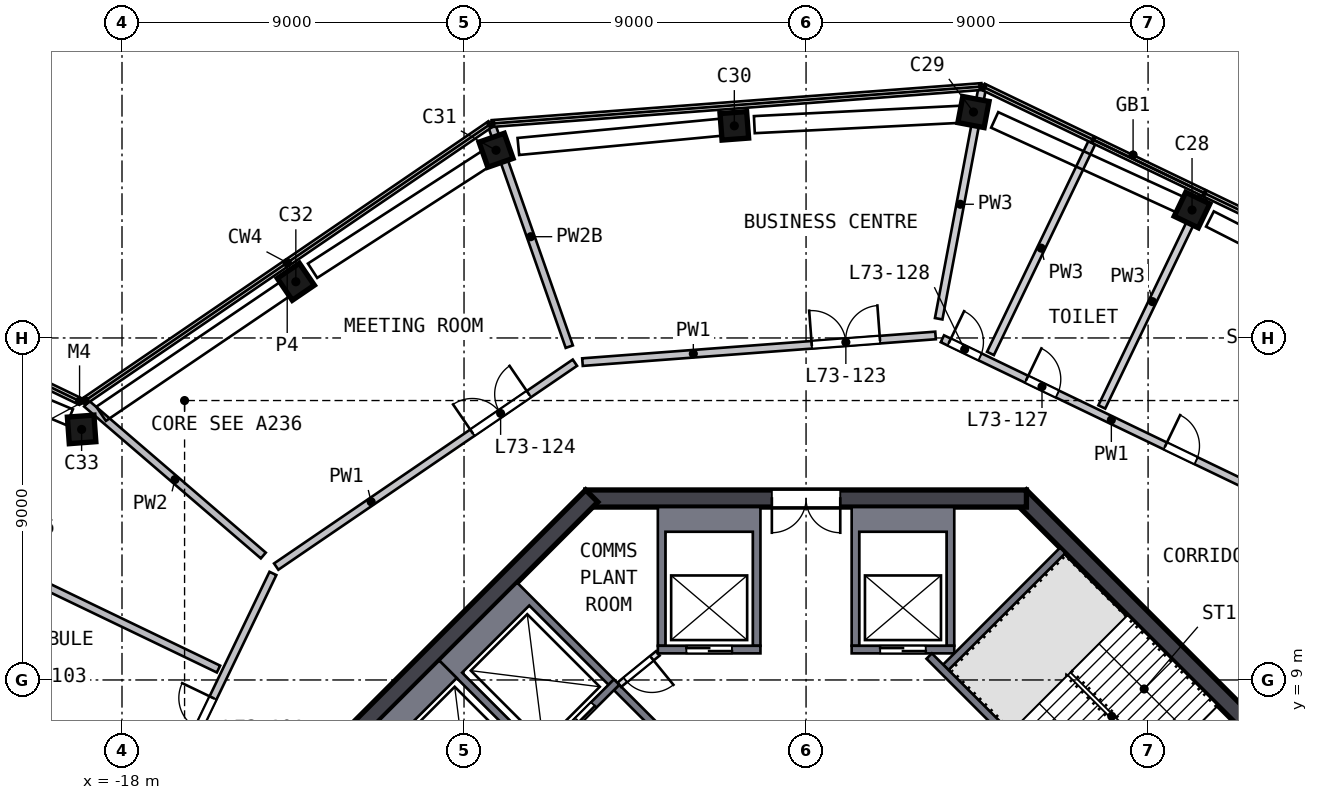
"""IFC4 building model, lengths in metres.
Left out: names, types, materials, properties, quantities, classifications, styles, units other than length and angle.
Written with IfcOpenShell. Run it as: python <this file> out.ifc"""

import sys

from ifc_helpers import new_model, si_unit, direction, frame, frame_2d, origin, origin_2d, place, context, subcontext, project, spatial, polyline, rectangle, outline, extrude, element, fill, save


model = new_model("IFC4")
c1 = context("Model", 3, precision=1e-05, world=origin(), true_north=direction((0.0, 1.0)))
c2 = subcontext(c1, "Body", "Model", "MODEL_VIEW")
j1 = project(units=[si_unit("LENGTHUNIT", "METRE"), si_unit("PLANEANGLEUNIT", "RADIAN")], contexts=[c1])
p1 = place(None, origin())
s1 = spatial("IfcSite", under=j1, at=p1, CompositionType="ELEMENT")
p2 = place(p1, origin())
s2 = spatial("IfcBuilding", under=s1, at=p2, CompositionType="ELEMENT")
p3 = place(p2, frame((0.0, 0.0, 295.0)))
s3 = spatial("IfcBuildingStorey", under=s2, at=p3, CompositionType="ELEMENT", Elevation=295.0)
p4 = place(p3, frame((10.252, 21.322, 0.0), z_axis=(-0.079403422, 0.037379974, 0.996141473), x_axis=(-0.897653527, 0.43187559, -0.08775888)))
e1 = element("IfcColumn", 1, at=p4, inside=s3, PredefinedType="COLUMN", context=c2, shape_type="SweptSolid", body=[
    extrude(rectangle(XDim=0.7, YDim=0.7, at=origin_2d()), origin(), (0.0, 0.0, 1.0), 4.206),
])
p5 = place(p3, frame((4.512, 23.926, 0.0), z_axis=(-0.088844536, 0.015958359, 0.995917657), x_axis=(0.978708302, -0.184343741, 0.090263194)))
e2 = element("IfcColumn", 2, at=p5, inside=s3, PredefinedType="COLUMN", context=c2, shape_type="SweptSolid", body=[
    extrude(rectangle(XDim=0.7, YDim=0.7, at=origin_2d()), origin(), (0.0, 0.0, 1.0), 4.207),
])
p6 = place(p3, frame((-1.782, 23.591, 0.0), z_axis=(-0.087471347, -0.007313464, 0.996140189), x_axis=(-0.993342185, -0.074613173, -0.087773449)))
e3 = element("IfcColumn", 3, at=p6, inside=s3, PredefinedType="COLUMN", context=c2, shape_type="SweptSolid", body=[
    extrude(rectangle(XDim=0.7, YDim=0.7, at=origin_2d()), origin(), (0.0, 0.0, 1.0), 4.206),
])
p7 = place(p3, frame((-8.055, 22.977, 0.0), z_axis=(-0.084956294, -0.030581945, 0.995915244), x_axis=(0.939868366, 0.329386102, 0.090289813)))
e4 = element("IfcColumn", 4, at=p7, inside=s3, PredefinedType="COLUMN", context=c2, shape_type="SweptSolid", body=[
    extrude(rectangle(XDim=0.7, YDim=0.7, at=origin_2d()), origin(), (0.0, 0.0, 1.0), 4.207),
])
p8 = place(p3, frame((-13.339, 19.54, 0.0), z_axis=(-0.072089807, -0.050091388, 0.996139505), x_axis=(-0.822815086, -0.561488906, -0.087781218)))
e5 = element("IfcColumn", 5, at=p8, inside=s3, PredefinedType="COLUMN", context=c2, shape_type="SweptSolid", body=[
    extrude(rectangle(XDim=0.7, YDim=0.7, at=origin_2d()), origin(), (0.0, 0.0, 1.0), 4.206),
])
p9 = place(p3, frame((-18.993, 15.679, 0.0), z_axis=(-0.057560792, -0.070848515, 0.995824906), x_axis=(0.995550487, 0.070467558, 0.062558383)))
e6 = element("IfcColumn", 6, at=p9, inside=s3, PredefinedType="COLUMN", context=c2, shape_type="SweptSolid", body=[
    extrude(rectangle(XDim=0.7, YDim=0.7, at=origin_2d()), origin(), (0.0, 0.0, 1.0), 4.208),
])
p10 = place(p3, frame((13.841, 5.64, 0.0), z_axis=(0.0, 0.0, 1.0), x_axis=(-0.707106781, 0.707106781, 0.0)))
e7 = element("IfcWall", 7, at=p10, inside=s3, PredefinedType="SHEAR", context=c2, shape_type="SweptSolid", body=[
    extrude(rectangle(XDim=11.598, YDim=0.45, at=frame_2d((5.799, 0.0))), origin(), (0.0, 0.0, 1.0), 4.5),
])
p11 = place(p10, frame((2.099, 0.0, 0.0)))
e8 = element("IfcOpeningElement", 8, at=p11, cuts=e7, PredefinedType="OPENING", context=c2, shape_type="SweptSolid", body=[
    extrude(rectangle(XDim=1.2, YDim=2.1, at=frame_2d((0.6, 1.05))), frame((0.0, 0.235, 0.0), z_axis=(0.0, -1.0, 0.0), x_axis=(1.0, 0.0, 0.0)), (0.0, 0.0, 1.0), 0.47),
])
p12 = place(p3, frame((5.799, 13.775, 0.0), z_axis=(0.0, 0.0, 1.0), x_axis=(-1.0, 0.0, 0.0)))
e9 = element("IfcWall", 9, at=p12, inside=s3, PredefinedType="SHEAR", context=c2, shape_type="SweptSolid", body=[
    extrude(rectangle(XDim=11.598, YDim=0.45, at=frame_2d((5.799, 0.0))), origin(), (0.0, 0.0, 1.0), 4.5),
])
p13 = place(p12, frame((4.899, 0.0, 0.0)))
e10 = element("IfcOpeningElement", 10, at=p13, cuts=e9, PredefinedType="OPENING", context=c2, shape_type="SweptSolid", body=[
    extrude(rectangle(XDim=1.8, YDim=2.1, at=frame_2d((0.9, 1.05))), frame((0.0, 0.235, 0.0), z_axis=(0.0, -1.0, 0.0), x_axis=(1.0, 0.0, 0.0)), (0.0, 0.0, 1.0), 0.47),
])
p14 = place(p3, frame((-5.64, 13.841, 0.0), z_axis=(0.0, 0.0, 1.0), x_axis=(-0.707106781, -0.707106781, 0.0)))
e11 = element("IfcWall", 11, at=p14, inside=s3, PredefinedType="SHEAR", context=c2, shape_type="SweptSolid", body=[
    extrude(rectangle(XDim=11.598, YDim=0.45, at=frame_2d((5.799, 0.0))), origin(), (0.0, 0.0, 1.0), 4.5),
])
p15 = place(p3, origin())
e12 = element("IfcWall", 12, at=p15, inside=s3, PredefinedType="SOLIDWALL", context=c2, shape_type="SweptSolid", body=[
    extrude(outline(polyline([(3.9, 9.9), (3.7, 9.9), (3.7, 12.9), (1.4, 12.9), (1.4, 9.9), (1.2, 9.9), (1.2, 13.55), (3.9, 13.55), (3.9, 9.9)])), origin(), (0.0, 0.0, 1.0), 4.19),
])
p16 = place(p3, frame((1.2, 9.8, 0.0), z_axis=(0.0, 0.0, 1.0), x_axis=(1.0, 0.0, 0.0)))
e13 = element("IfcWall", 13, at=p16, inside=s3, PredefinedType="SOLIDWALL", context=c2, shape_type="SweptSolid", body=[
    extrude(rectangle(XDim=2.7, YDim=0.2, at=frame_2d((1.35, 0.0))), origin(), (0.0, 0.0, 1.0), 4.19),
])
p17 = place(p16, frame((0.75, 0.0, 0.0)))
e14 = element("IfcOpeningElement", 14, at=p17, cuts=e13, PredefinedType="OPENING", context=c2, shape_type="SweptSolid", body=[
    extrude(rectangle(XDim=1.2, YDim=2.1, at=frame_2d((0.6, 1.05))), frame((0.0, 0.11, 0.0), z_axis=(0.0, -1.0, 0.0), x_axis=(1.0, 0.0, 0.0)), (0.0, 0.0, 1.0), 0.22),
])
p18 = place(p3, origin())
e15 = element("IfcWall", 15, at=p18, inside=s3, PredefinedType="SOLIDWALL", context=c2, shape_type="SweptSolid", body=[
    extrude(outline(polyline([(-3.9, 13.55), (-1.2, 13.55), (-1.2, 9.9), (-1.4, 9.9), (-1.4, 12.9), (-3.7, 12.9), (-3.7, 9.9), (-3.9, 9.9), (-3.9, 13.55)])), origin(), (0.0, 0.0, 1.0), 4.19),
])
p19 = place(p3, frame((-1.2, 9.8, 0.0), z_axis=(0.0, 0.0, 1.0), x_axis=(-1.0, 0.0, 0.0)))
e16 = element("IfcWall", 16, at=p19, inside=s3, PredefinedType="SOLIDWALL", context=c2, shape_type="SweptSolid", body=[
    extrude(rectangle(XDim=2.7, YDim=0.2, at=frame_2d((1.35, 0.0))), origin(), (0.0, 0.0, 1.0), 4.19),
])
p20 = place(p19, frame((0.75, 0.0, 0.0)))
e17 = element("IfcOpeningElement", 17, at=p20, cuts=e16, PredefinedType="OPENING", context=c2, shape_type="SweptSolid", body=[
    extrude(rectangle(XDim=1.2, YDim=2.1, at=frame_2d((0.6, 1.05))), frame((0.0, 0.11, 0.0), z_axis=(0.0, -1.0, 0.0), x_axis=(1.0, 0.0, 0.0)), (0.0, 0.0, 1.0), 0.22),
])
p21 = place(p3, origin())
e18 = element("IfcWall", 18, at=p21, inside=s3, PredefinedType="SOLIDWALL", context=c2, shape_type="SweptSolid", body=[
    extrude(outline(polyline([(-9.652, 9.51), (-7.601, 11.561), (-5.056, 9.016), (-5.197, 8.874), (-7.283, 10.96), (-9.051, 9.192), (-6.965, 7.106), (-7.106, 6.965), (-9.652, 9.51)])), origin(), (0.0, 0.0, 1.0), 4.19),
])
p22 = place(p3, frame((-4.985, 8.945, 0.0), z_axis=(0.0, 0.0, 1.0), x_axis=(-0.707106781, -0.707106781, 0.0)))
e19 = element("IfcWall", 19, at=p22, inside=s3, PredefinedType="SOLIDWALL", context=c2, shape_type="SweptSolid", body=[
    extrude(rectangle(XDim=2.9, YDim=0.2, at=frame_2d((1.45, 0.0))), origin(), (0.0, 0.0, 1.0), 4.19),
])
p23 = place(p22, frame((0.85, 0.0, 0.0)))
e20 = element("IfcOpeningElement", 20, at=p23, cuts=e19, PredefinedType="OPENING", context=c2, shape_type="SweptSolid", body=[
    extrude(rectangle(XDim=1.2, YDim=2.1, at=frame_2d((0.6, 1.05))), frame((0.0, 0.11, 0.0), z_axis=(0.0, -1.0, 0.0), x_axis=(1.0, 0.0, 0.0)), (0.0, 0.0, 1.0), 0.22),
])
p24 = place(p3, origin())
e21 = element("IfcWall", 21, at=p24, inside=s3, PredefinedType="SOLIDWALL", context=c2, shape_type="SweptSolid", body=[
    extrude(outline(polyline([(-11.561, 7.601), (-9.652, 9.51), (-9.192, 9.051), (-10.96, 7.283), (-8.874, 5.197), (-9.016, 5.056), (-11.561, 7.601)])), origin(), (0.0, 0.0, 1.0), 4.19),
])
p25 = place(p3, frame((3.24, 9.629, 0.0), z_axis=(0.0, 0.0, 1.0), x_axis=(0.707106781, -0.707106781, 0.0)))
e22 = element("IfcWall", 22, at=p25, inside=s3, PredefinedType="SOLIDWALL", context=c2, shape_type="SweptSolid", body=[
    extrude(rectangle(XDim=9.036, YDim=0.2, at=frame_2d((4.518, 0.0))), origin(), (0.0, 0.0, 1.0), 4.19),
])
p26 = place(p25, frame((7.018, 0.0, 0.0)))
e23 = element("IfcOpeningElement", 23, at=p26, cuts=e22, PredefinedType="OPENING", context=c2, shape_type="SweptSolid", body=[
    extrude(rectangle(XDim=1.2, YDim=2.1, at=frame_2d((0.6, 1.05))), frame((0.0, 0.11, 0.0), z_axis=(0.0, -1.0, 0.0), x_axis=(1.0, 0.0, 0.0)), (0.0, 0.0, 1.0), 0.22),
])
p27 = place(p3, frame((3.677, 9.334, 0.0), z_axis=(0.0, 0.0, 1.0), x_axis=(0.707106781, 0.707106781, 0.0)))
e24 = element("IfcWall", 24, at=p27, inside=s3, PredefinedType="SOLIDWALL", context=c2, shape_type="SweptSolid", body=[
    extrude(rectangle(XDim=4.35, YDim=0.2, at=frame_2d((2.175, 0.0))), origin(), (0.0, 0.0, 1.0), 4.19),
])
p28 = place(p3, frame((-3.005, 6.823, 0.0), z_axis=(0.0, 0.0, 1.0), x_axis=(-0.707106781, 0.707106781, 0.0)))
e25 = element("IfcWall", 25, at=p28, inside=s3, PredefinedType="SOLIDWALL", context=c2, shape_type="SweptSolid", body=[
    extrude(rectangle(XDim=2.8, YDim=0.2, at=frame_2d((1.4, 0.0))), origin(), (0.0, 0.0, 1.0), 4.19),
])
p29 = place(p3, frame((-3.9, 9.7, 0.0), z_axis=(0.0, 0.0, 1.0), x_axis=(-0.775559878, -0.631274009, 0.0)))
e26 = element("IfcWall", 26, at=p29, inside=s3, PredefinedType="PARTITIONING", context=c2, shape_type="SweptSolid", body=[
    extrude(rectangle(XDim=1.308, YDim=0.15, at=frame_2d((0.654, 0.0))), origin(), (0.0, 0.0, 1.0), 4.19),
])
p30 = place(p29, frame((0.204, 0.0, 0.0)))
e27 = element("IfcOpeningElement", 27, at=p30, cuts=e26, PredefinedType="OPENING", context=c2, shape_type="SweptSolid", body=[
    extrude(rectangle(XDim=0.9, YDim=2.1, at=frame_2d((0.45, 1.05))), frame((0.0, 0.085, 0.0), z_axis=(0.0, -1.0, 0.0), x_axis=(1.0, 0.0, 0.0)), (0.0, 0.0, 1.0), 0.17),
])
p31 = place(p3, frame((-18.066, 3.407, 0.0), z_axis=(0.0, 0.0, 1.0), x_axis=(0.433334957, 0.901232942, 0.0)))
e28 = element("IfcWall", 28, at=p31, inside=s3, PredefinedType="SOLIDWALL", context=c2, shape_type="SweptSolid", body=[
    extrude(rectangle(XDim=9.317, YDim=0.2, at=frame_2d((4.658, 0.0))), origin(), (0.0, 0.0, 1.0), 4.19),
])
p32 = place(p31, frame((3.881, 0.0, 0.0)))
e29 = element("IfcOpeningElement", 29, at=p32, cuts=e28, PredefinedType="OPENING", context=c2, shape_type="SweptSolid", body=[
    extrude(rectangle(XDim=1.8, YDim=2.1, at=frame_2d((0.9, 1.05))), frame((0.0, 0.11, 0.0), z_axis=(0.0, -1.0, 0.0), x_axis=(1.0, 0.0, 0.0)), (0.0, 0.0, 1.0), 0.22),
])
p33 = place(p3, frame((-13.942, 11.984, 0.0), z_axis=(0.0, 0.0, 1.0), x_axis=(0.825910244, 0.563801622, 0.0)))
e30 = element("IfcWall", 30, at=p33, inside=s3, PredefinedType="SOLIDWALL", context=c2, shape_type="SweptSolid", body=[
    extrude(rectangle(XDim=9.517, YDim=0.2, at=frame_2d((4.758, 0.0))), origin(), (0.0, 0.0, 1.0), 4.19),
])
p34 = place(p33, frame((6.25, 0.0, 0.0)))
e31 = element("IfcOpeningElement", 31, at=p34, cuts=e30, PredefinedType="OPENING", context=c2, shape_type="SweptSolid", body=[
    extrude(rectangle(XDim=1.8, YDim=2.1, at=frame_2d((0.9, 1.05))), frame((0.0, 0.11, 0.0), z_axis=(0.0, -1.0, 0.0), x_axis=(1.0, 0.0, 0.0)), (0.0, 0.0, 1.0), 0.22),
])
p35 = place(p3, frame((-5.883, 17.365, 0.0), z_axis=(0.0, 0.0, 1.0), x_axis=(0.997157921, 0.075339772, 0.0)))
e32 = element("IfcWall", 32, at=p35, inside=s3, PredefinedType="SOLIDWALL", context=c2, shape_type="SweptSolid", body=[
    extrude(rectangle(XDim=9.316, YDim=0.2, at=frame_2d((4.658, 0.0))), origin(), (0.0, 0.0, 1.0), 4.19),
])
p36 = place(p35, frame((6.05, 0.0, 0.0)))
e33 = element("IfcOpeningElement", 33, at=p36, cuts=e32, PredefinedType="OPENING", context=c2, shape_type="SweptSolid", body=[
    extrude(rectangle(XDim=1.8, YDim=2.1, at=frame_2d((0.9, 1.05))), frame((0.0, 0.11, 0.0), z_axis=(0.0, -1.0, 0.0), x_axis=(1.0, 0.0, 0.0)), (0.0, 0.0, 1.0), 0.22),
])
p37 = place(p3, frame((3.587, 17.979, 0.0), z_axis=(0.0, 0.0, 1.0), x_axis=(0.901238255, -0.433323906, 0.0)))
e34 = element("IfcWall", 34, at=p37, inside=s3, PredefinedType="SOLIDWALL", context=c2, shape_type="SweptSolid", body=[
    extrude(rectangle(XDim=9.317, YDim=0.2, at=frame_2d((4.658, 0.0))), origin(), (0.0, 0.0, 1.0), 4.19),
])
p38 = place(p37, frame((6.508, 0.0, 0.0)))
e35 = element("IfcOpeningElement", 35, at=p38, cuts=e34, PredefinedType="OPENING", context=c2, shape_type="SweptSolid", body=[
    extrude(rectangle(XDim=0.9, YDim=2.1, at=frame_2d((0.45, 1.05))), frame((0.0, 0.11, 0.0), z_axis=(0.0, -1.0, 0.0), x_axis=(1.0, 0.0, 0.0)), (0.0, 0.0, 1.0), 0.22),
])
p39 = place(p37, frame((2.458, 0.0, 0.0)))
e36 = element("IfcOpeningElement", 36, at=p39, cuts=e34, PredefinedType="OPENING", context=c2, shape_type="SweptSolid", body=[
    extrude(rectangle(XDim=0.9, YDim=2.1, at=frame_2d((0.45, 1.05))), frame((0.0, 0.11, 0.0), z_axis=(0.0, -1.0, 0.0), x_axis=(1.0, 0.0, 0.0)), (0.0, 0.0, 1.0), 0.22),
])
p40 = place(p37, frame((0.2, 0.0, 0.0)))
e37 = element("IfcOpeningElement", 37, at=p40, cuts=e34, PredefinedType="OPENING", context=c2, shape_type="SweptSolid", body=[
    extrude(rectangle(XDim=0.9, YDim=2.1, at=frame_2d((0.45, 1.05))), frame((0.0, 0.11, 0.0), z_axis=(0.0, -1.0, 0.0), x_axis=(1.0, 0.0, 0.0)), (0.0, 0.0, 1.0), 0.22),
])
p41 = place(p3, frame((-16.89, 6.315, 0.0), z_axis=(0.0, 0.0, 1.0), x_axis=(-0.901235517, 0.433329602, 0.0)))
e38 = element("IfcWall", 38, at=p41, inside=s3, PredefinedType="SOLIDWALL", context=c2, shape_type="SweptSolid", body=[
    extrude(rectangle(XDim=10.302, YDim=0.2, at=frame_2d((5.151, 0.0))), origin(), (0.0, 0.0, 1.0), 4.19),
])
p42 = place(p41, frame((2.95, 0.0, 0.0)))
e39 = element("IfcOpeningElement", 39, at=p42, cuts=e38, PredefinedType="OPENING", context=c2, shape_type="SweptSolid", body=[
    extrude(rectangle(XDim=1.0, YDim=2.1, at=frame_2d((0.5, 1.05))), frame((0.0, 0.11, 0.0), z_axis=(0.0, -1.0, 0.0), x_axis=(1.0, 0.0, 0.0)), (0.0, 0.0, 1.0), 0.22),
])
p43 = place(p3, frame((-24.745, 13.751, 0.0), z_axis=(0.0, 0.0, 1.0), x_axis=(0.901226261, -0.43334885, 0.0)))
e40 = element("IfcWall", 40, at=p43, inside=s3, PredefinedType="SOLIDWALL", context=c2, shape_type="SweptSolid", body=[
    extrude(rectangle(XDim=10.302, YDim=0.2, at=frame_2d((5.151, 0.0))), origin(), (0.0, 0.0, 1.0), 4.19),
])
p44 = place(p43, frame((2.5, 0.0, 0.0)))
e41 = element("IfcOpeningElement", 41, at=p44, cuts=e40, PredefinedType="OPENING", context=c2, shape_type="SweptSolid", body=[
    extrude(rectangle(XDim=1.0, YDim=2.1, at=frame_2d((0.5, 1.05))), frame((0.0, 0.11, 0.0), z_axis=(0.0, -1.0, 0.0), x_axis=(1.0, 0.0, 0.0)), (0.0, 0.0, 1.0), 0.22),
])
p45 = place(p3, frame((-18.932, 16.272, 0.0), z_axis=(0.0, 0.0, 1.0), x_axis=(0.75836782, -0.651826856, 0.0)))
e42 = element("IfcWall", 42, at=p45, inside=s3, PredefinedType="SOLIDWALL", context=c2, shape_type="SweptSolid", body=[
    extrude(rectangle(XDim=6.132, YDim=0.2, at=frame_2d((3.066, 0.0))), origin(), (0.0, 0.0, 1.0), 4.19),
])
p46 = place(p3, frame((-6.23, 17.771, 0.0), z_axis=(0.0, 0.0, 1.0), x_axis=(-0.330857589, 0.943680696, 0.0)))
e43 = element("IfcWall", 43, at=p46, inside=s3, PredefinedType="SOLIDWALL", context=c2, shape_type="SweptSolid", body=[
    extrude(rectangle(XDim=6.132, YDim=0.2, at=frame_2d((3.066, 0.0))), origin(), (0.0, 0.0, 1.0), 3.69),
])
p47 = place(p3, frame((4.626, 24.531, 0.0), z_axis=(0.0, 0.0, 1.0), x_axis=(-0.185338945, -0.982674654, 0.0)))
e44 = element("IfcWall", 44, at=p47, inside=s3, PredefinedType="SOLIDWALL", context=c2, shape_type="SweptSolid", body=[
    extrude(rectangle(XDim=6.132, YDim=0.2, at=frame_2d((3.066, 0.0))), origin(), (0.0, 0.0, 1.0), 4.19),
])
p48 = place(p3, frame((4.853, 17.593, 0.0), z_axis=(0.0, 0.0, 1.0), x_axis=(0.433345282, 0.901227977, 0.0)))
e45 = element("IfcWall", 45, at=p48, inside=s3, PredefinedType="SOLIDWALL", context=c2, shape_type="SweptSolid", body=[
    extrude(rectangle(XDim=6.15, YDim=0.2, at=frame_2d((3.075, 0.0))), origin(), (0.0, 0.0, 1.0), 4.19),
])
p49 = place(p3, frame((7.782, 16.185, 0.0), z_axis=(0.0, 0.0, 1.0), x_axis=(0.433360787, 0.901220522, 0.0)))
e46 = element("IfcWall", 46, at=p49, inside=s3, PredefinedType="SOLIDWALL", context=c2, shape_type="SweptSolid", body=[
    extrude(rectangle(XDim=6.15, YDim=0.2, at=frame_2d((3.075, 0.0))), origin(), (0.0, 0.0, 1.0), 4.19),
])
p50 = place(p17, origin())
e47 = element("IfcDoor", 47, at=p50, inside=s3, OperationType="DOUBLE_DOOR_SLIDING", PredefinedType="DOOR", context=c2, shape_type="SweptSolid", body=[
    extrude(rectangle(XDim=1.2, YDim=2.1, at=frame_2d((0.6, 1.05))), frame((0.0, 0.025, 0.0), z_axis=(0.0, -1.0, 0.0), x_axis=(1.0, 0.0, 0.0)), (0.0, 0.0, 1.0), 0.05),
])
fill(e14, e47)
p51 = place(p20, origin())
e48 = element("IfcDoor", 48, at=p51, inside=s3, OperationType="DOUBLE_DOOR_SLIDING", PredefinedType="DOOR", context=c2, shape_type="SweptSolid", body=[
    extrude(rectangle(XDim=1.2, YDim=2.1, at=frame_2d((0.6, 1.05))), frame((0.0, 0.025, 0.0), z_axis=(0.0, -1.0, 0.0), x_axis=(1.0, 0.0, 0.0)), (0.0, 0.0, 1.0), 0.05),
])
fill(e17, e48)
p52 = place(p23, origin())
e49 = element("IfcDoor", 49, at=p52, inside=s3, OperationType="DOUBLE_DOOR_SLIDING", PredefinedType="DOOR", context=c2, shape_type="SweptSolid", body=[
    extrude(rectangle(XDim=1.2, YDim=2.1, at=frame_2d((0.6, 1.05))), frame((0.0, 0.025, 0.0), z_axis=(0.0, -1.0, 0.0), x_axis=(1.0, 0.0, 0.0)), (0.0, 0.0, 1.0), 0.05),
])
fill(e20, e49)
p53 = place(p13, origin())
e50 = element("IfcDoor", 50, at=p53, inside=s3, OperationType="DOUBLE_DOOR_SINGLE_SWING", PredefinedType="DOOR", context=c2, shape_type="SweptSolid", body=[
    extrude(rectangle(XDim=1.8, YDim=2.1, at=frame_2d((0.9, 1.05))), frame((0.0, 0.025, 0.0), z_axis=(0.0, -1.0, 0.0), x_axis=(1.0, 0.0, 0.0)), (0.0, 0.0, 1.0), 0.05),
])
fill(e10, e50)
p54 = place(p30, origin())
e51 = element("IfcDoor", 51, at=p54, inside=s3, OperationType="SINGLE_SWING_LEFT", PredefinedType="DOOR", context=c2, shape_type="SweptSolid", body=[
    extrude(rectangle(XDim=0.9, YDim=2.1, at=frame_2d((0.45, 1.05))), frame((0.0, 0.025, 0.0), z_axis=(0.0, -1.0, 0.0), x_axis=(1.0, 0.0, 0.0)), (0.0, 0.0, 1.0), 0.05),
])
fill(e27, e51)
p55 = place(p32, origin())
e52 = element("IfcDoor", 52, at=p55, inside=s3, OperationType="DOUBLE_DOOR_SINGLE_SWING", PredefinedType="DOOR", context=c2, shape_type="SweptSolid", body=[
    extrude(rectangle(XDim=1.8, YDim=2.1, at=frame_2d((0.9, 1.05))), frame((0.0, 0.025, 0.0), z_axis=(0.0, -1.0, 0.0), x_axis=(1.0, 0.0, 0.0)), (0.0, 0.0, 1.0), 0.05),
])
fill(e29, e52)
p56 = place(p42, origin())
e53 = element("IfcDoor", 53, at=p56, inside=s3, OperationType="SINGLE_SWING_LEFT", PredefinedType="DOOR", context=c2, shape_type="SweptSolid", body=[
    extrude(rectangle(XDim=1.0, YDim=2.1, at=frame_2d((0.5, 1.05))), frame((0.0, 0.025, 0.0), z_axis=(0.0, -1.0, 0.0), x_axis=(1.0, 0.0, 0.0)), (0.0, 0.0, 1.0), 0.05),
])
fill(e39, e53)
p57 = place(p38, origin())
e54 = element("IfcDoor", 54, at=p57, inside=s3, OperationType="SINGLE_SWING_LEFT", PredefinedType="DOOR", context=c2, shape_type="SweptSolid", body=[
    extrude(rectangle(XDim=0.9, YDim=2.1, at=frame_2d((0.45, 1.05))), frame((0.0, 0.025, 0.0), z_axis=(0.0, -1.0, 0.0), x_axis=(1.0, 0.0, 0.0)), (0.0, 0.0, 1.0), 0.05),
])
fill(e35, e54)
p58 = place(p36, origin())
e55 = element("IfcDoor", 55, at=p58, inside=s3, OperationType="DOUBLE_DOOR_SINGLE_SWING", PredefinedType="DOOR", context=c2, shape_type="SweptSolid", body=[
    extrude(rectangle(XDim=1.8, YDim=2.1, at=frame_2d((0.9, 1.05))), frame((0.0, 0.025, 0.0), z_axis=(0.0, -1.0, 0.0), x_axis=(1.0, 0.0, 0.0)), (0.0, 0.0, 1.0), 0.05),
])
fill(e33, e55)
p59 = place(p34, origin())
e56 = element("IfcDoor", 56, at=p59, inside=s3, OperationType="DOUBLE_DOOR_SINGLE_SWING", PredefinedType="DOOR", context=c2, shape_type="SweptSolid", body=[
    extrude(rectangle(XDim=1.8, YDim=2.1, at=frame_2d((0.9, 1.05))), frame((0.0, 0.025, 0.0), z_axis=(0.0, -1.0, 0.0), x_axis=(1.0, 0.0, 0.0)), (0.0, 0.0, 1.0), 0.05),
])
fill(e31, e56)
p60 = place(p39, origin())
e57 = element("IfcDoor", 57, at=p60, inside=s3, OperationType="SINGLE_SWING_LEFT", PredefinedType="DOOR", context=c2, shape_type="SweptSolid", body=[
    extrude(rectangle(XDim=0.9, YDim=2.1, at=frame_2d((0.45, 1.05))), frame((0.0, 0.025, 0.0), z_axis=(0.0, -1.0, 0.0), x_axis=(1.0, 0.0, 0.0)), (0.0, 0.0, 1.0), 0.05),
])
fill(e36, e57)
p61 = place(p40, origin())
e58 = element("IfcDoor", 58, at=p61, inside=s3, OperationType="SINGLE_SWING_LEFT", PredefinedType="DOOR", context=c2, shape_type="SweptSolid", body=[
    extrude(rectangle(XDim=0.9, YDim=2.1, at=frame_2d((0.45, 1.05))), frame((0.0, 0.025, 0.0), z_axis=(0.0, -1.0, 0.0), x_axis=(1.0, 0.0, 0.0)), (0.0, 0.0, 1.0), 0.05),
])
fill(e37, e58)
save(model, sys.argv[1])
